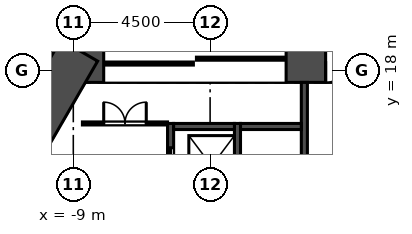
"""IFC4 building model, lengths in metres.
Left out: names, types, materials, properties, quantities, classifications, styles, units other than length and angle.
Written with IfcOpenShell. Run it as: python <this file> out.ifc"""

import sys

from ifc_helpers import new_model, si_unit, direction, frame, frame_2d, origin, place, context, subcontext, project, spatial, rectangle, extrude, element, fill, save


model = new_model("IFC4")
c1 = context("Model", 3, precision=1e-05, world=origin(), true_north=direction((0.0, 1.0)))
c2 = subcontext(c1, "Body", "Model", "MODEL_VIEW")
j1 = project(units=[si_unit("LENGTHUNIT", "METRE"), si_unit("PLANEANGLEUNIT", "RADIAN")], contexts=[c1])
p1 = place(None, origin())
s1 = spatial("IfcSite", under=j1, at=p1, CompositionType="ELEMENT")
p2 = place(p1, origin())
s2 = spatial("IfcBuilding", under=s1, at=p2, CompositionType="ELEMENT")
p3 = place(p2, frame((0.0, 0.0, 25.0)))
s3 = spatial("IfcBuildingStorey", under=s2, at=p3, CompositionType="ELEMENT", Elevation=25.0)
p4 = place(p3, frame((9.412, 18.3, 0.0), z_axis=(0.0, 0.0, 1.0), x_axis=(-1.0, 0.0, 0.0)))
e1 = element("IfcWall", 1, at=p4, inside=s3, PredefinedType="SHEAR", context=c2, shape_type="SweptSolid", body=[
    extrude(rectangle(XDim=18.823, YDim=1.4, at=frame_2d((9.412, 0.0))), origin(), (0.0, 0.0, 1.0), 4.5),
])
p5 = place(p4, frame((8.711, 0.0, 0.0)))
e2 = element("IfcOpeningElement", 2, at=p5, cuts=e1, PredefinedType="OPENING", context=c2, shape_type="SweptSolid", body=[
    extrude(rectangle(XDim=1.4, YDim=2.1, at=frame_2d((0.7, 1.05))), frame((0.0, 0.71, 0.0), z_axis=(0.0, -1.0, 0.0), x_axis=(1.0, 0.0, 0.0)), (0.0, 0.0, 1.0), 1.42),
])
p6 = place(p4, frame((11.412, 0.0, 0.0)))
e3 = element("IfcOpeningElement", 3, at=p6, cuts=e1, PredefinedType="OPENING", context=c2, shape_type="SweptSolid", body=[
    extrude(rectangle(XDim=6.0, YDim=2.4, at=frame_2d((3.0, 1.2))), frame((0.0, 0.71, 0.0), z_axis=(0.0, -1.0, 0.0), x_axis=(1.0, 0.0, 0.0)), (0.0, 0.0, 1.0), 1.42),
])
p7 = place(p4, frame((1.412, 0.0, 0.0)))
e4 = element("IfcOpeningElement", 4, at=p7, cuts=e1, PredefinedType="OPENING", context=c2, shape_type="SweptSolid", body=[
    extrude(rectangle(XDim=6.0, YDim=2.4, at=frame_2d((3.0, 1.2))), frame((0.0, 0.71, 0.0), z_axis=(0.0, -1.0, 0.0), x_axis=(1.0, 0.0, 0.0)), (0.0, 0.0, 1.0), 1.42),
])
p8 = place(p3, frame((-8.805, 18.65, 0.0), z_axis=(0.0, 0.0, 1.0), x_axis=(-0.50000187635, -0.866024320471, 0.0)))
e5 = element("IfcWall", 5, at=p8, inside=s3, PredefinedType="SHEAR", context=c2, shape_type="SweptSolid", body=[
    extrude(rectangle(XDim=9.177, YDim=1.4, at=frame_2d((4.588, 0.0))), origin(), (0.0, 0.0, 1.0), 4.5),
])
p9 = place(p3, frame((-4.353, 56.207, 0.0), z_axis=(0.0, 0.0, 1.0), x_axis=(-0.500000836325, -0.866024920931, 0.0)))
e6 = element("IfcWall", 6, at=p9, inside=s3, PredefinedType="SOLIDWALL", context=c2, shape_type="SweptSolid", body=[
    extrude(rectangle(XDim=56.0, YDim=0.34, at=frame_2d((28.0, 0.0))), origin(), (0.0, 0.0, 1.0), 4.2),
])
p10 = place(p9, frame((1.5, 0.0, 0.9)))
e7 = element("IfcOpeningElement", 7, at=p10, cuts=e6, PredefinedType="OPENING", context=c2, shape_type="SweptSolid", body=[
    extrude(rectangle(XDim=1.885, YDim=3.0, at=frame_2d((0.942, 1.5))), frame((0.0, 0.18, 0.0), z_axis=(0.0, -1.0, 0.0), x_axis=(1.0, 0.0, 0.0)), (0.0, 0.0, 1.0), 0.36),
])
p11 = place(p9, frame((4.5, 0.0, 0.9)))
e8 = element("IfcOpeningElement", 8, at=p11, cuts=e6, PredefinedType="OPENING", context=c2, shape_type="SweptSolid", body=[
    extrude(rectangle(XDim=1.885, YDim=3.0, at=frame_2d((0.942, 1.5))), frame((0.0, 0.18, 0.0), z_axis=(0.0, -1.0, 0.0), x_axis=(1.0, 0.0, 0.0)), (0.0, 0.0, 1.0), 0.36),
])
p12 = place(p9, frame((7.5, 0.0, 0.9)))
e9 = element("IfcOpeningElement", 9, at=p12, cuts=e6, PredefinedType="OPENING", context=c2, shape_type="SweptSolid", body=[
    extrude(rectangle(XDim=1.885, YDim=3.0, at=frame_2d((0.942, 1.5))), frame((0.0, 0.18, 0.0), z_axis=(0.0, -1.0, 0.0), x_axis=(1.0, 0.0, 0.0)), (0.0, 0.0, 1.0), 0.36),
])
p13 = place(p9, frame((10.5, 0.0, 0.9)))
e10 = element("IfcOpeningElement", 10, at=p13, cuts=e6, PredefinedType="OPENING", context=c2, shape_type="SweptSolid", body=[
    extrude(rectangle(XDim=1.885, YDim=3.0, at=frame_2d((0.942, 1.5))), frame((0.0, 0.18, 0.0), z_axis=(0.0, -1.0, 0.0), x_axis=(1.0, 0.0, 0.0)), (0.0, 0.0, 1.0), 0.36),
])
p14 = place(p9, frame((13.5, 0.0, 0.9)))
e11 = element("IfcOpeningElement", 11, at=p14, cuts=e6, PredefinedType="OPENING", context=c2, shape_type="SweptSolid", body=[
    extrude(rectangle(XDim=1.885, YDim=3.0, at=frame_2d((0.942, 1.5))), frame((0.0, 0.18, 0.0), z_axis=(0.0, -1.0, 0.0), x_axis=(1.0, 0.0, 0.0)), (0.0, 0.0, 1.0), 0.36),
])
p15 = place(p9, frame((16.5, 0.0, 0.9)))
e12 = element("IfcOpeningElement", 12, at=p15, cuts=e6, PredefinedType="OPENING", context=c2, shape_type="SweptSolid", body=[
    extrude(rectangle(XDim=1.885, YDim=3.0, at=frame_2d((0.942, 1.5))), frame((0.0, 0.18, 0.0), z_axis=(0.0, -1.0, 0.0), x_axis=(1.0, 0.0, 0.0)), (0.0, 0.0, 1.0), 0.36),
])
p16 = place(p9, frame((19.5, 0.0, 0.9)))
e13 = element("IfcOpeningElement", 13, at=p16, cuts=e6, PredefinedType="OPENING", context=c2, shape_type="SweptSolid", body=[
    extrude(rectangle(XDim=1.885, YDim=3.0, at=frame_2d((0.942, 1.5))), frame((0.0, 0.18, 0.0), z_axis=(0.0, -1.0, 0.0), x_axis=(1.0, 0.0, 0.0)), (0.0, 0.0, 1.0), 0.36),
])
p17 = place(p9, frame((22.5, 0.0, 0.9)))
e14 = element("IfcOpeningElement", 14, at=p17, cuts=e6, PredefinedType="OPENING", context=c2, shape_type="SweptSolid", body=[
    extrude(rectangle(XDim=1.885, YDim=3.0, at=frame_2d((0.942, 1.5))), frame((0.0, 0.18, 0.0), z_axis=(0.0, -1.0, 0.0), x_axis=(1.0, 0.0, 0.0)), (0.0, 0.0, 1.0), 0.36),
])
p18 = place(p9, frame((25.5, 0.0, 0.0)))
e15 = element("IfcOpeningElement", 15, at=p18, cuts=e6, PredefinedType="OPENING", context=c2, shape_type="SweptSolid", body=[
    extrude(rectangle(XDim=1.885, YDim=2.6, at=frame_2d((0.942, 1.3))), frame((0.0, 0.18, 0.0), z_axis=(0.0, -1.0, 0.0), x_axis=(1.0, 0.0, 0.0)), (0.0, 0.0, 1.0), 0.36),
])
p19 = place(p9, frame((28.5, 0.0, 0.9)))
e16 = element("IfcOpeningElement", 16, at=p19, cuts=e6, PredefinedType="OPENING", context=c2, shape_type="SweptSolid", body=[
    extrude(rectangle(XDim=1.885, YDim=3.0, at=frame_2d((0.942, 1.5))), frame((0.0, 0.18, 0.0), z_axis=(0.0, -1.0, 0.0), x_axis=(1.0, 0.0, 0.0)), (0.0, 0.0, 1.0), 0.36),
])
p20 = place(p9, frame((31.5, 0.0, 0.9)))
e17 = element("IfcOpeningElement", 17, at=p20, cuts=e6, PredefinedType="OPENING", context=c2, shape_type="SweptSolid", body=[
    extrude(rectangle(XDim=1.885, YDim=3.0, at=frame_2d((0.942, 1.5))), frame((0.0, 0.18, 0.0), z_axis=(0.0, -1.0, 0.0), x_axis=(1.0, 0.0, 0.0)), (0.0, 0.0, 1.0), 0.36),
])
p21 = place(p9, frame((34.5, 0.0, 0.9)))
e18 = element("IfcOpeningElement", 18, at=p21, cuts=e6, PredefinedType="OPENING", context=c2, shape_type="SweptSolid", body=[
    extrude(rectangle(XDim=1.885, YDim=3.0, at=frame_2d((0.942, 1.5))), frame((0.0, 0.18, 0.0), z_axis=(0.0, -1.0, 0.0), x_axis=(1.0, 0.0, 0.0)), (0.0, 0.0, 1.0), 0.36),
])
p22 = place(p9, frame((37.5, 0.0, 0.9)))
e19 = element("IfcOpeningElement", 19, at=p22, cuts=e6, PredefinedType="OPENING", context=c2, shape_type="SweptSolid", body=[
    extrude(rectangle(XDim=1.885, YDim=3.0, at=frame_2d((0.942, 1.5))), frame((0.0, 0.18, 0.0), z_axis=(0.0, -1.0, 0.0), x_axis=(1.0, 0.0, 0.0)), (0.0, 0.0, 1.0), 0.36),
])
p23 = place(p9, frame((40.5, 0.0, 0.9)))
e20 = element("IfcOpeningElement", 20, at=p23, cuts=e6, PredefinedType="OPENING", context=c2, shape_type="SweptSolid", body=[
    extrude(rectangle(XDim=1.885, YDim=3.0, at=frame_2d((0.942, 1.5))), frame((0.0, 0.18, 0.0), z_axis=(0.0, -1.0, 0.0), x_axis=(1.0, 0.0, 0.0)), (0.0, 0.0, 1.0), 0.36),
])
p24 = place(p9, frame((43.5, 0.0, 0.9)))
e21 = element("IfcOpeningElement", 21, at=p24, cuts=e6, PredefinedType="OPENING", context=c2, shape_type="SweptSolid", body=[
    extrude(rectangle(XDim=1.885, YDim=3.0, at=frame_2d((0.942, 1.5))), frame((0.0, 0.18, 0.0), z_axis=(0.0, -1.0, 0.0), x_axis=(1.0, 0.0, 0.0)), (0.0, 0.0, 1.0), 0.36),
])
p25 = place(p9, frame((46.5, 0.0, 0.9)))
e22 = element("IfcOpeningElement", 22, at=p25, cuts=e6, PredefinedType="OPENING", context=c2, shape_type="SweptSolid", body=[
    extrude(rectangle(XDim=1.885, YDim=3.0, at=frame_2d((0.942, 1.5))), frame((0.0, 0.18, 0.0), z_axis=(0.0, -1.0, 0.0), x_axis=(1.0, 0.0, 0.0)), (0.0, 0.0, 1.0), 0.36),
])
p26 = place(p9, frame((49.5, 0.0, 0.9)))
e23 = element("IfcOpeningElement", 23, at=p26, cuts=e6, PredefinedType="OPENING", context=c2, shape_type="SweptSolid", body=[
    extrude(rectangle(XDim=1.885, YDim=3.0, at=frame_2d((0.942, 1.5))), frame((0.0, 0.18, 0.0), z_axis=(0.0, -1.0, 0.0), x_axis=(1.0, 0.0, 0.0)), (0.0, 0.0, 1.0), 0.36),
])
p27 = place(p9, frame((52.5, 0.0, 0.9)))
e24 = element("IfcOpeningElement", 24, at=p27, cuts=e6, PredefinedType="OPENING", context=c2, shape_type="SweptSolid", body=[
    extrude(rectangle(XDim=1.885, YDim=3.0, at=frame_2d((0.942, 1.5))), frame((0.0, 0.18, 0.0), z_axis=(0.0, -1.0, 0.0), x_axis=(1.0, 0.0, 0.0)), (0.0, 0.0, 1.0), 0.36),
])
p28 = place(p3, frame((-5.8, 8.25, -2.0), z_axis=(0.0, 0.0, 1.0), x_axis=(0.0, 1.0, 0.0)))
e25 = element("IfcWall", 25, at=p28, inside=s3, PredefinedType="SOLIDWALL", context=c2, shape_type="SweptSolid", body=[
    extrude(rectangle(XDim=8.0, YDim=0.2, at=frame_2d((4.0, 0.0))), origin(), (0.0, 0.0, 1.0), 6.2),
])
p29 = place(p28, frame((0.8, 0.0, 2.0)))
e26 = element("IfcOpeningElement", 26, at=p29, cuts=e25, PredefinedType="OPENING", context=c2, shape_type="SweptSolid", body=[
    extrude(rectangle(XDim=1.2, YDim=2.1, at=frame_2d((0.6, 1.05))), frame((0.0, 0.11, 0.0), z_axis=(0.0, -1.0, 0.0), x_axis=(1.0, 0.0, 0.0)), (0.0, 0.0, 1.0), 0.22),
])
p30 = place(p28, frame((3.4, 0.0, 2.0)))
e27 = element("IfcOpeningElement", 27, at=p30, cuts=e25, PredefinedType="OPENING", context=c2, shape_type="SweptSolid", body=[
    extrude(rectangle(XDim=1.2, YDim=2.1, at=frame_2d((0.6, 1.05))), frame((0.0, 0.11, 0.0), z_axis=(0.0, -1.0, 0.0), x_axis=(1.0, 0.0, 0.0)), (0.0, 0.0, 1.0), 0.22),
])
p31 = place(p28, frame((6.0, 0.0, 2.0)))
e28 = element("IfcOpeningElement", 28, at=p31, cuts=e25, PredefinedType="OPENING", context=c2, shape_type="SweptSolid", body=[
    extrude(rectangle(XDim=1.2, YDim=2.1, at=frame_2d((0.6, 1.05))), frame((0.0, 0.11, 0.0), z_axis=(0.0, -1.0, 0.0), x_axis=(1.0, 0.0, 0.0)), (0.0, 0.0, 1.0), 0.22),
])
p32 = place(p3, frame((-3.6, 8.45, -2.0), z_axis=(0.0, 0.0, 1.0), x_axis=(0.0, 1.0, 0.0)))
e29 = element("IfcWall", 29, at=p32, inside=s3, PredefinedType="SOLIDWALL", context=c2, shape_type="SweptSolid", body=[
    extrude(rectangle(XDim=7.8, YDim=0.2, at=frame_2d((3.9, 0.0))), origin(), (0.0, 0.0, 1.0), 6.2),
])
p33 = place(p3, frame((-1.4, 5.85, -2.0), z_axis=(0.0, 0.0, 1.0), x_axis=(0.0, 1.0, 0.0)))
e30 = element("IfcWall", 30, at=p33, inside=s3, PredefinedType="SOLIDWALL", context=c2, shape_type="SweptSolid", body=[
    extrude(rectangle(XDim=11.75, YDim=0.2, at=frame_2d((5.875, 0.0))), origin(), (0.0, 0.0, 1.0), 6.2),
])
p34 = place(p33, frame((3.2, 0.0, 2.0)))
e31 = element("IfcOpeningElement", 31, at=p34, cuts=e30, PredefinedType="OPENING", context=c2, shape_type="SweptSolid", body=[
    extrude(rectangle(XDim=1.2, YDim=2.1, at=frame_2d((0.6, 1.05))), frame((0.0, 0.11, 0.0), z_axis=(0.0, -1.0, 0.0), x_axis=(1.0, 0.0, 0.0)), (0.0, 0.0, 1.0), 0.22),
])
p35 = place(p33, frame((0.65, 0.0, 2.0)))
e32 = element("IfcOpeningElement", 32, at=p35, cuts=e30, PredefinedType="OPENING", context=c2, shape_type="SweptSolid", body=[
    extrude(rectangle(XDim=1.1, YDim=2.1, at=frame_2d((0.55, 1.05))), frame((0.0, 0.11, 0.0), z_axis=(0.0, -1.0, 0.0), x_axis=(1.0, 0.0, 0.0)), (0.0, 0.0, 1.0), 0.22),
])
for number, where, z_axis, x_axis in (
    (33, (-5.7, 16.15, -2.0), (0.0, 0.0, 1.0), (1.0, 0.0, 0.0)),
    (34, (-3.5, 16.15, -2.0), (0.0, 0.0, 1.0), (1.0, 0.0, 0.0)),
):
    element("IfcWall", number, at=place(p3, frame(where, z_axis=z_axis, x_axis=x_axis)), inside=s3, PredefinedType="SOLIDWALL", context=c2, shape_type="SweptSolid", body=[
        extrude(rectangle(XDim=2.0, YDim=0.2, at=frame_2d((1.0, 0.0))), origin(), (0.0, 0.0, 1.0), 6.2),
    ])
p36 = place(p3, frame((-8.7, 16.25, 0.0), z_axis=(0.0, 0.0, 1.0), x_axis=(1.0, 0.0, 0.0)))
e35 = element("IfcWall", 35, at=p36, inside=s3, PredefinedType="PARTITIONING", context=c2, shape_type="SweptSolid", body=[
    extrude(rectangle(XDim=2.8, YDim=0.1, at=frame_2d((1.4, 0.0))), origin(), (0.0, 0.0, 1.0), 4.2),
])
p37 = place(p36, frame((0.7, 0.0, 0.0)))
e36 = element("IfcOpeningElement", 36, at=p37, cuts=e35, PredefinedType="OPENING", context=c2, shape_type="SweptSolid", body=[
    extrude(rectangle(XDim=1.4, YDim=2.1, at=frame_2d((0.7, 1.05))), frame((0.0, 0.06, 0.0), z_axis=(0.0, -1.0, 0.0), x_axis=(1.0, 0.0, 0.0)), (0.0, 0.0, 1.0), 0.12),
])
p38 = place(p31, origin())
e37 = element("IfcDoor", 37, at=p38, inside=s3, OperationType="SLIDING_TO_LEFT", PredefinedType="DOOR", context=c2, shape_type="SweptSolid", body=[
    extrude(rectangle(XDim=1.2, YDim=2.1, at=frame_2d((0.6, 1.05))), frame((0.0, 0.025, 0.0), z_axis=(0.0, -1.0, 0.0), x_axis=(1.0, 0.0, 0.0)), (0.0, 0.0, 1.0), 0.05),
])
fill(e28, e37)
p39 = place(p37, origin())
e38 = element("IfcDoor", 38, at=p39, inside=s3, OperationType="DOUBLE_DOOR_SINGLE_SWING", PredefinedType="DOOR", context=c2, shape_type="SweptSolid", body=[
    extrude(rectangle(XDim=1.4, YDim=2.1, at=frame_2d((0.7, 1.05))), frame((0.0, 0.025, 0.0), z_axis=(0.0, -1.0, 0.0), x_axis=(1.0, 0.0, 0.0)), (0.0, 0.0, 1.0), 0.05),
])
fill(e36, e38)
p40 = place(p5, origin())
e39 = element("IfcDoor", 39, at=p40, inside=s3, OperationType="DOUBLE_DOOR_SINGLE_SWING", PredefinedType="DOOR", context=c2, shape_type="SweptSolid", body=[
    extrude(rectangle(XDim=1.4, YDim=2.1, at=frame_2d((0.7, 1.05))), frame((0.0, 0.025, 0.0), z_axis=(0.0, -1.0, 0.0), x_axis=(1.0, 0.0, 0.0)), (0.0, 0.0, 1.0), 0.05),
])
fill(e2, e39)
p41 = place(p6, origin())
e40 = element("IfcDoor", 40, at=p41, inside=s3, OperationType="DOUBLE_DOOR_SLIDING", PredefinedType="DOOR", context=c2, shape_type="SweptSolid", body=[
    extrude(rectangle(XDim=6.0, YDim=2.4, at=frame_2d((3.0, 1.2))), frame((0.0, 0.025, 0.0), z_axis=(0.0, -1.0, 0.0), x_axis=(1.0, 0.0, 0.0)), (0.0, 0.0, 1.0), 0.05),
])
fill(e3, e40)
save(model, sys.argv[1])
